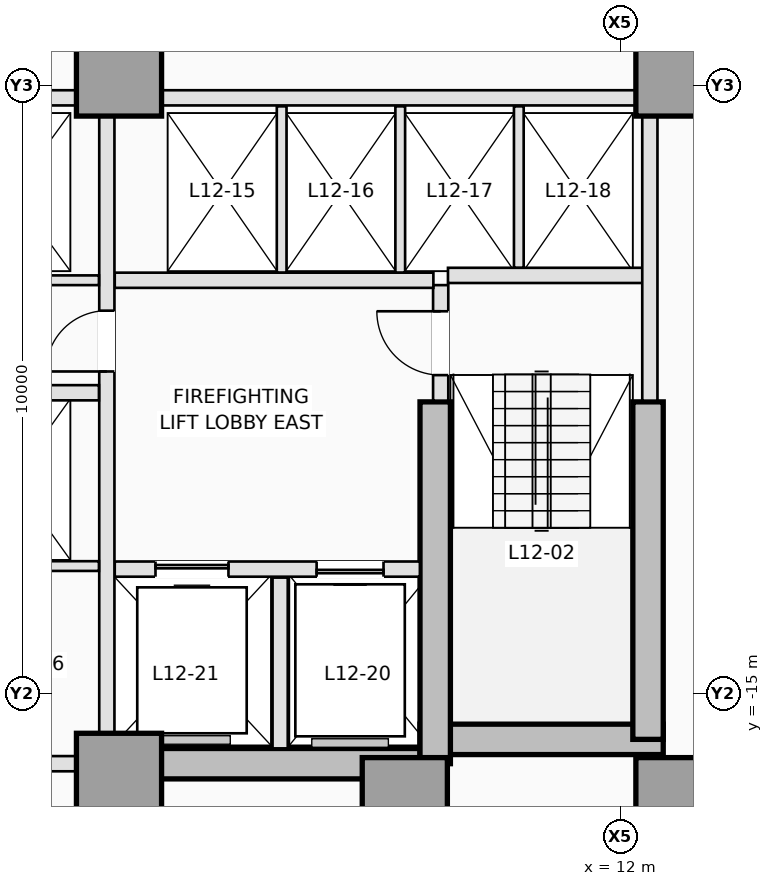
"""IFC4 building model, lengths in metres.
Left out: names, types, materials, properties, quantities, classifications, styles, units other than length and angle.
Written with IfcOpenShell. Run it as: python <this file> out.ifc"""

import sys

from ifc_helpers import new_model, si_unit, direction, frame, frame_2d, origin, origin_2d, place, context, subcontext, project, spatial, rectangle, extrude, element, fill, save


model = new_model("IFC4")
c1 = context("Model", 3, precision=1e-05, world=origin(), true_north=direction((0.0, 1.0)))
c2 = subcontext(c1, "Body", "Model", "MODEL_VIEW")
j1 = project(units=[si_unit("LENGTHUNIT", "METRE"), si_unit("PLANEANGLEUNIT", "RADIAN")], contexts=[c1])
p1 = place(None, origin())
s1 = spatial("IfcSite", under=j1, at=p1, CompositionType="ELEMENT")
p2 = place(p1, origin())
s2 = spatial("IfcBuilding", under=s1, at=p2, CompositionType="ELEMENT")
p3 = place(p2, frame((0.0, 0.0, 48.6)))
s3 = spatial("IfcBuildingStorey", under=s2, at=p3, CompositionType="ELEMENT", Elevation=48.6)
p4 = place(p3, frame((3.75, -16.15, 0.0), z_axis=(0.0, 0.0, 1.0), x_axis=(1.0, 0.0, 0.0)))
e1 = element("IfcWall", 1, at=p4, inside=s3, PredefinedType="SHEAR", context=c2, shape_type="SweptSolid", body=[
    extrude(rectangle(XDim=5.2, YDim=0.5, at=frame_2d((2.6, 0.0))), origin(), (0.0, 0.0, 1.0), 3.5),
])
p5 = place(p3, frame((8.7, -15.75, 0.0), z_axis=(0.0, 0.0, 1.0), x_axis=(1.0, 0.0, 0.0)))
e2 = element("IfcWall", 2, at=p5, inside=s3, PredefinedType="SHEAR", context=c2, shape_type="SweptSolid", body=[
    extrude(rectangle(XDim=4.0, YDim=0.5, at=frame_2d((2.0, 0.0))), origin(), (0.0, 0.0, 1.0), 3.5),
])
p6 = place(p3, frame((12.45, -15.75, 0.0), z_axis=(0.0, 0.0, 1.0), x_axis=(0.0, 1.0, 0.0)))
e3 = element("IfcWall", 3, at=p6, inside=s3, PredefinedType="SHEAR", context=c2, shape_type="SweptSolid", body=[
    extrude(rectangle(XDim=5.55, YDim=0.5, at=frame_2d((2.775, 0.0))), origin(), (0.0, 0.0, 1.0), 3.5),
])
p7 = place(p3, frame((8.95, -16.15, 0.0), z_axis=(0.0, 0.0, 1.0), x_axis=(0.0, 1.0, 0.0)))
e4 = element("IfcWall", 4, at=p7, inside=s3, PredefinedType="SHEAR", context=c2, shape_type="SweptSolid", body=[
    extrude(rectangle(XDim=5.95, YDim=0.5, at=frame_2d((2.975, 0.0))), origin(), (0.0, 0.0, 1.0), 3.5),
])
for number, where, z_axis, x_axis in (
    (5, (3.75, -16.35, 0.0), (0.0, 0.0, 1.0), (1.0, 0.0, 0.0)),
    (6, (8.45, -16.75, 0.0), (0.0, 0.0, 1.0), (1.0, 0.0, 0.0)),
    (7, (12.95, -16.75, 0.0), (0.0, 0.0, 1.0), (1.0, 0.0, 0.0)),
    (8, (3.75, -4.8, 0.0), (0.0, 0.0, 1.0), (1.0, 0.0, 0.0)),
    (9, (12.95, -4.8, 0.0), (0.0, 0.0, 1.0), (1.0, 0.0, 0.0)),
):
    element("IfcColumn", number, at=place(p3, frame(where, z_axis=z_axis, x_axis=x_axis)), inside=s3, PredefinedType="COLUMN", context=c2, shape_type="SweptSolid", body=[
        extrude(rectangle(XDim=1.4, YDim=1.4, at=origin_2d()), origin(), (0.0, 0.0, 1.0), 3.5),
    ])
p8 = place(p3, frame((9.04, -10.18, 0.0), z_axis=(0.0, 0.0, 1.0), x_axis=(0.0, 1.0, 0.0)))
e10 = element("IfcWall", 10, at=p8, inside=s3, PredefinedType="PARTITIONING", context=c2, shape_type="SweptSolid", body=[
    extrude(rectangle(XDim=1.9, YDim=0.25, at=frame_2d((0.95, 0.0))), origin(), (0.0, 0.0, 1.0), 3.25),
])
p9 = place(p8, frame((0.42, 0.0, 0.0)))
e11 = element("IfcOpeningElement", 11, at=p9, cuts=e10, PredefinedType="OPENING", context=c2, shape_type="SweptSolid", body=[
    extrude(rectangle(XDim=1.05, YDim=2.15, at=frame_2d((0.525, 1.075))), frame((0.0, 0.135, 0.0), z_axis=(0.0, -1.0, 0.0), x_axis=(1.0, 0.0, 0.0)), (0.0, 0.0, 1.0), 0.27),
])
p10 = place(p3, frame((9.16, -8.12, 0.0), z_axis=(0.0, 0.0, 1.0), x_axis=(1.0, 0.0, 0.0)))
e12 = element("IfcWall", 12, at=p10, inside=s3, PredefinedType="PARTITIONING", context=c2, shape_type="SweptSolid", body=[
    extrude(rectangle(XDim=3.22, YDim=0.25, at=frame_2d((1.61, 0.0))), origin(), (0.0, 0.0, 1.0), 3.25),
])
p11 = place(p3, frame((12.48, -10.18, 0.0), z_axis=(0.0, 0.0, 1.0), x_axis=(0.0, 1.0, 0.0)))
e13 = element("IfcWall", 13, at=p11, inside=s3, PredefinedType="PARTITIONING", context=c2, shape_type="SweptSolid", body=[
    extrude(rectangle(XDim=4.678, YDim=0.25, at=frame_2d((2.339, 0.0))), origin(), (0.0, 0.0, 1.0), 3.25),
])
p12 = place(p3, frame((3.68, -12.95, 0.0), z_axis=(0.0, 0.0, 1.0), x_axis=(1.0, 0.0, 0.0)))
e14 = element("IfcWall", 14, at=p12, inside=s3, PredefinedType="PARTITIONING", context=c2, shape_type="SweptSolid", body=[
    extrude(rectangle(XDim=5.018, YDim=0.25, at=frame_2d((2.509, 0.0))), origin(), (0.0, 0.0, 1.0), 3.25),
])
p13 = place(p12, frame((3.32, 0.0, 0.0)))
e15 = element("IfcOpeningElement", 15, at=p13, cuts=e14, PredefinedType="OPENING", context=c2, shape_type="SweptSolid", body=[
    extrude(rectangle(XDim=1.1, YDim=2.15, at=frame_2d((0.55, 1.075))), frame((0.0, 0.135, 0.0), z_axis=(0.0, -1.0, 0.0), x_axis=(1.0, 0.0, 0.0)), (0.0, 0.0, 1.0), 0.27),
])
p14 = place(p12, frame((0.67, 0.0, 0.0)))
e16 = element("IfcOpeningElement", 16, at=p14, cuts=e14, PredefinedType="OPENING", context=c2, shape_type="SweptSolid", body=[
    extrude(rectangle(XDim=1.2, YDim=2.15, at=frame_2d((0.6, 1.075))), frame((0.0, 0.135, 0.0), z_axis=(0.0, -1.0, 0.0), x_axis=(1.0, 0.0, 0.0)), (0.0, 0.0, 1.0), 0.27),
])
p15 = place(p3, frame((6.4, -15.898, 0.0), z_axis=(0.0, 0.0, 1.0), x_axis=(0.0, 1.0, 0.0)))
e17 = element("IfcWall", 17, at=p15, inside=s3, PredefinedType="PARTITIONING", context=c2, shape_type="SweptSolid", body=[
    extrude(rectangle(XDim=2.808, YDim=0.25, at=frame_2d((1.404, 0.0))), origin(), (0.0, 0.0, 1.0), 3.25),
])
p16 = place(p3, frame((3.68, -8.2, 0.0), z_axis=(0.0, 0.0, 1.0), x_axis=(1.0, 0.0, 0.0)))
e18 = element("IfcWall", 18, at=p16, inside=s3, PredefinedType="PARTITIONING", context=c2, shape_type="SweptSolid", body=[
    extrude(rectangle(XDim=5.24, YDim=0.25, at=frame_2d((2.62, 0.0))), origin(), (0.0, 0.0, 1.0), 3.25),
])
p17 = place(p3, frame((3.55, -15.648, 0.0), z_axis=(0.0, 0.0, 1.0), x_axis=(0.0, 1.0, 0.0)))
e19 = element("IfcWall", 19, at=p17, inside=s3, PredefinedType="PARTITIONING", context=c2, shape_type="SweptSolid", body=[
    extrude(rectangle(XDim=10.146, YDim=0.25, at=frame_2d((5.073, 0.0))), origin(), (0.0, 0.0, 1.0), 3.25),
])
p18 = place(p17, frame((5.948, 0.0, 0.0)))
e20 = element("IfcOpeningElement", 20, at=p18, cuts=e19, PredefinedType="OPENING", context=c2, shape_type="SweptSolid", body=[
    extrude(rectangle(XDim=1.0, YDim=2.15, at=frame_2d((0.5, 1.075))), frame((0.0, 0.135, 0.0), z_axis=(0.0, -1.0, 0.0), x_axis=(1.0, 0.0, 0.0)), (0.0, 0.0, 1.0), 0.27),
])
p19 = place(p3, frame((4.452, -5.2, 0.0), z_axis=(0.0, 0.0, 1.0), x_axis=(1.0, 0.0, 0.0)))
e21 = element("IfcWall", 21, at=p19, inside=s3, PredefinedType="PARTITIONING", context=c2, shape_type="SweptSolid", body=[
    extrude(rectangle(XDim=7.796, YDim=0.25, at=frame_2d((3.898, 0.0))), origin(), (0.0, 0.0, 1.0), 3.25),
])
p20 = place(p3, frame((0.95, -5.2, 0.0), z_axis=(0.0, 0.0, 1.0), x_axis=(1.0, 0.0, 0.0)))
e22 = element("IfcWall", 22, at=p20, inside=s3, PredefinedType="PARTITIONING", context=c2, shape_type="SweptSolid", body=[
    extrude(rectangle(XDim=2.098, YDim=0.25, at=frame_2d((1.049, 0.0))), origin(), (0.0, 0.0, 1.0), 3.25),
])
for number, where, z_axis, x_axis in (
    (23, (6.425, -8.073, 0.0), (0.0, 0.0, 1.0), (0.0, 1.0, 0.0)),
    (24, (8.375, -8.073, 0.0), (0.0, 0.0, 1.0), (0.0, 1.0, 0.0)),
):
    element("IfcWall", number, at=place(p3, frame(where, z_axis=z_axis, x_axis=x_axis)), inside=s3, PredefinedType="PARTITIONING", context=c2, shape_type="SweptSolid", body=[
        extrude(rectangle(XDim=2.733, YDim=0.16, at=frame_2d((1.366, 0.0))), origin(), (0.0, 0.0, 1.0), 3.25),
    ])
p21 = place(p3, frame((10.325, -7.993, 0.0), z_axis=(0.0, 0.0, 1.0), x_axis=(0.0, 1.0, 0.0)))
e25 = element("IfcWall", 25, at=p21, inside=s3, PredefinedType="PARTITIONING", context=c2, shape_type="SweptSolid", body=[
    extrude(rectangle(XDim=2.653, YDim=0.16, at=frame_2d((1.326, 0.0))), origin(), (0.0, 0.0, 1.0), 3.25),
])
p22 = place(p3, frame((-3.048, -16.15, 0.0), z_axis=(0.0, 0.0, 1.0), x_axis=(1.0, 0.0, 0.0)))
e26 = element("IfcWall", 26, at=p22, inside=s3, PredefinedType="PARTITIONING", context=c2, shape_type="SweptSolid", body=[
    extrude(rectangle(XDim=6.096, YDim=0.25, at=frame_2d((3.048, 0.0))), origin(), (0.0, 0.0, 1.0), 2.3),
])
p23 = place(p3, frame((0.95, -8.2, 0.0), z_axis=(0.0, 0.0, 1.0), x_axis=(1.0, 0.0, 0.0)))
e27 = element("IfcWall", 27, at=p23, inside=s3, PredefinedType="PARTITIONING", context=c2, shape_type="SweptSolid", body=[
    extrude(rectangle(XDim=2.47, YDim=0.16, at=frame_2d((1.235, 0.0))), origin(), (0.0, 0.0, 1.0), 3.25),
])
p24 = place(p3, frame((0.95, -10.05, 0.0), z_axis=(0.0, 0.0, 1.0), x_axis=(1.0, 0.0, 0.0)))
e28 = element("IfcWall", 28, at=p24, inside=s3, PredefinedType="PARTITIONING", context=c2, shape_type="SweptSolid", body=[
    extrude(rectangle(XDim=2.47, YDim=0.25, at=frame_2d((1.235, 0.0))), origin(), (0.0, 0.0, 1.0), 3.25),
])
p25 = place(p3, frame((-3.42, -12.9, 0.0), z_axis=(0.0, 0.0, 1.0), x_axis=(1.0, 0.0, 0.0)))
e29 = element("IfcWall", 29, at=p25, inside=s3, PredefinedType="PARTITIONING", context=c2, shape_type="SweptSolid", body=[
    extrude(rectangle(XDim=6.84, YDim=0.16, at=frame_2d((3.42, 0.0))), origin(), (0.0, 0.0, 1.0), 3.25),
])
p26 = place(p25, frame((2.98, 0.0, 0.0)))
e30 = element("IfcOpeningElement", 30, at=p26, cuts=e29, PredefinedType="OPENING", context=c2, shape_type="SweptSolid", body=[
    extrude(rectangle(XDim=0.88, YDim=2.12, at=frame_2d((0.44, 1.06))), frame((0.0, 0.09, 0.0), z_axis=(0.0, -1.0, 0.0), x_axis=(1.0, 0.0, 0.0)), (0.0, 0.0, 1.0), 0.18),
])
p27 = place(p13, origin())
e31 = element("IfcDoor", 31, at=p27, inside=s3, OperationType="SLIDING_TO_RIGHT", PredefinedType="DOOR", context=c2, shape_type="SweptSolid", body=[
    extrude(rectangle(XDim=1.1, YDim=2.15, at=frame_2d((0.55, 1.075))), frame((0.0, 0.025, 0.0), z_axis=(0.0, -1.0, 0.0), x_axis=(1.0, 0.0, 0.0)), (0.0, 0.0, 1.0), 0.05),
])
fill(e15, e31)
p28 = place(p14, origin())
e32 = element("IfcDoor", 32, at=p28, inside=s3, OperationType="SLIDING_TO_LEFT", PredefinedType="DOOR", context=c2, shape_type="SweptSolid", body=[
    extrude(rectangle(XDim=1.2, YDim=2.15, at=frame_2d((0.6, 1.075))), frame((0.0, 0.025, 0.0), z_axis=(0.0, -1.0, 0.0), x_axis=(1.0, 0.0, 0.0)), (0.0, 0.0, 1.0), 0.05),
])
fill(e16, e32)
p29 = place(p9, origin())
e33 = element("IfcDoor", 33, at=p29, inside=s3, OperationType="SINGLE_SWING_RIGHT", PredefinedType="DOOR", context=c2, shape_type="SweptSolid", body=[
    extrude(rectangle(XDim=1.05, YDim=2.15, at=frame_2d((0.525, 1.075))), frame((0.0, 0.025, 0.0), z_axis=(0.0, -1.0, 0.0), x_axis=(1.0, 0.0, 0.0)), (0.0, 0.0, 1.0), 0.05),
])
fill(e11, e33)
p30 = place(p18, origin())
e34 = element("IfcDoor", 34, at=p30, inside=s3, OperationType="SINGLE_SWING_LEFT", PredefinedType="DOOR", context=c2, shape_type="SweptSolid", body=[
    extrude(rectangle(XDim=1.0, YDim=2.15, at=frame_2d((0.5, 1.075))), frame((0.0, 0.025, 0.0), z_axis=(0.0, -1.0, 0.0), x_axis=(1.0, 0.0, 0.0)), (0.0, 0.0, 1.0), 0.05),
])
fill(e20, e34)
save(model, sys.argv[1])
